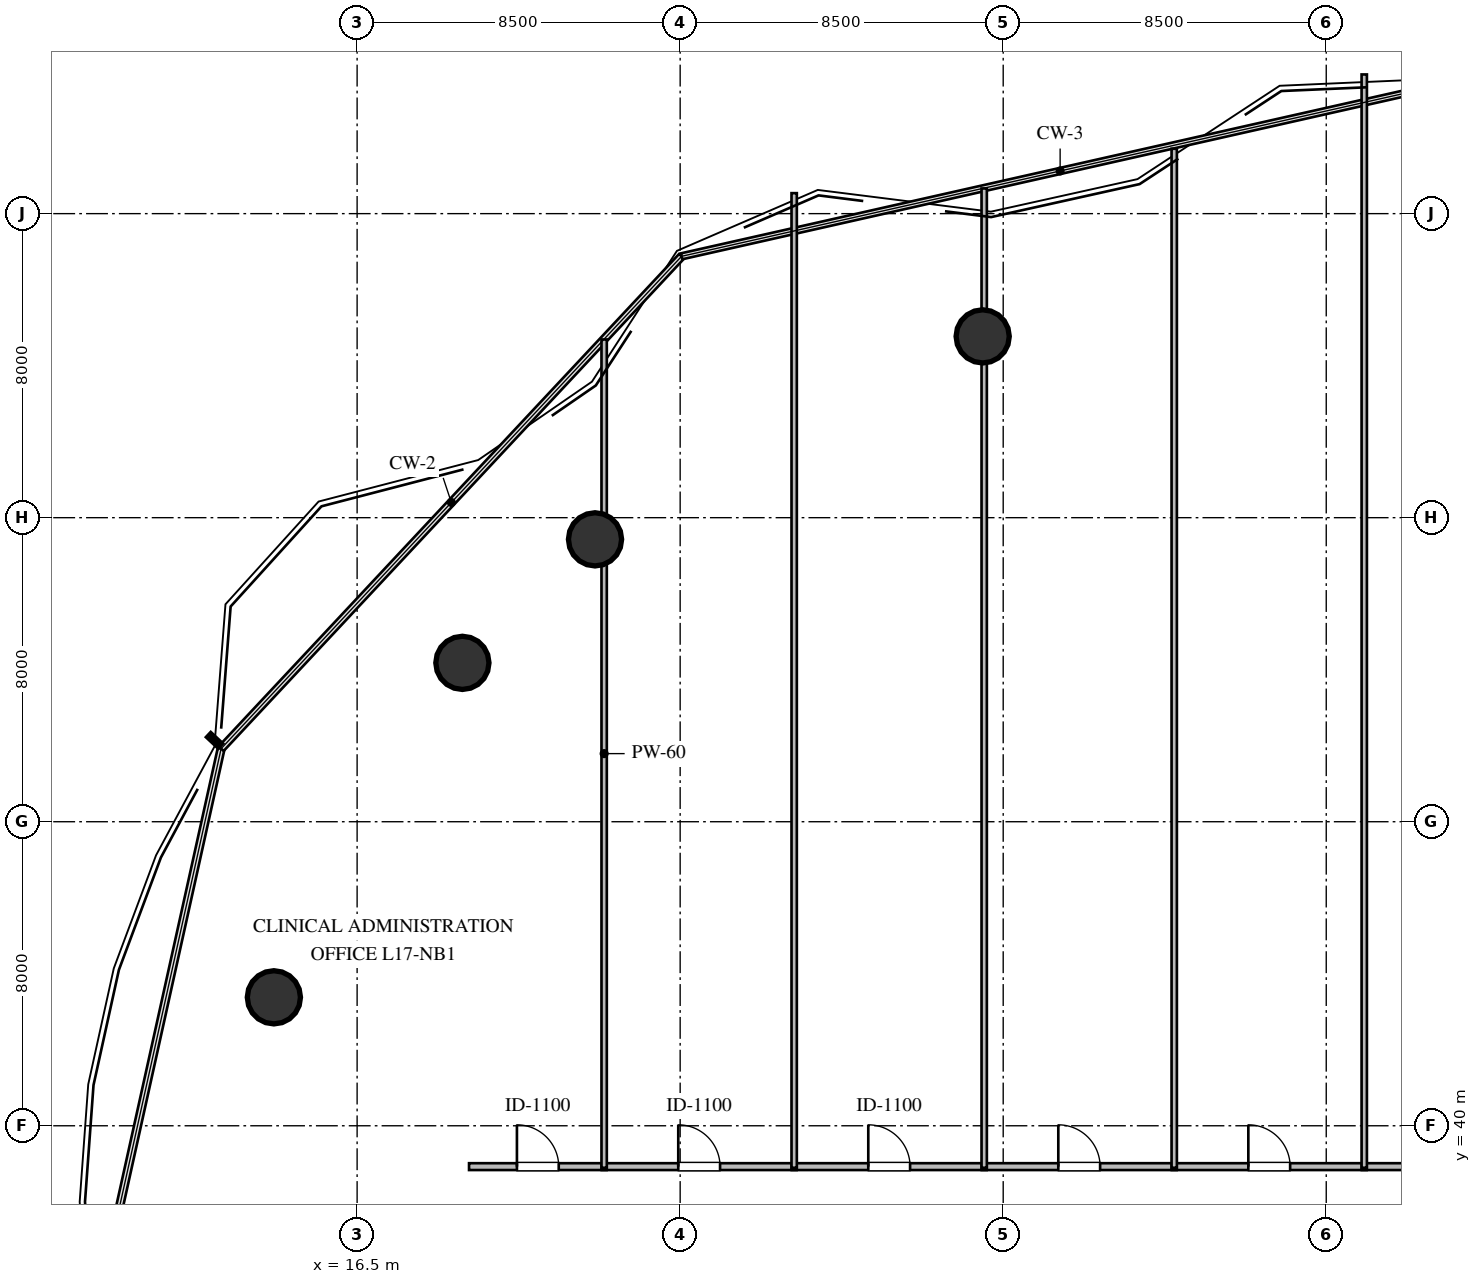
"""IFC4 building model, lengths in metres.
Left out: names, types, materials, properties, quantities, classifications, styles, units other than length and angle.
Written with IfcOpenShell. Run it as: python <this file> out.ifc"""

import sys

from ifc_helpers import new_model, si_unit, direction, frame, frame_2d, origin, origin_2d, place, context, subcontext, project, spatial, rectangle, circle, extrude, element, fill, save


model = new_model("IFC4")
c1 = context("Model", 3, precision=1e-05, world=origin(), true_north=direction((0.0, 1.0)))
c2 = subcontext(c1, "Body", "Model", "MODEL_VIEW")
j1 = project(units=[si_unit("LENGTHUNIT", "METRE"), si_unit("PLANEANGLEUNIT", "RADIAN")], contexts=[c1])
p1 = place(None, origin())
s1 = spatial("IfcSite", under=j1, at=p1, CompositionType="ELEMENT")
p2 = place(p1, origin())
s2 = spatial("IfcBuilding", under=s1, at=p2, CompositionType="ELEMENT")
p3 = place(p2, frame((0.0, 0.0, 67.2)))
s3 = spatial("IfcBuildingStorey", under=s2, at=p3, CompositionType="ELEMENT", Elevation=67.2)
for number, where, z_axis, x_axis in (
    (1, (32.96, 60.77, 0.0), (0.0, 0.0, 1.0), (1.0, 0.0, 0.0)),
    (2, (22.76, 55.43, 0.0), (0.0, 0.0, 1.0), (1.0, 0.0, 0.0)),
    (3, (19.27, 52.18, 0.0), (0.0, 0.0, 1.0), (1.0, 0.0, 0.0)),
    (4, (14.31, 43.38, 0.0), (0.0, 0.0, 1.0), (1.0, 0.0, 0.0)),
):
    element("IfcColumn", number, at=place(p3, frame(where, z_axis=z_axis, x_axis=x_axis)), inside=s3, PredefinedType="COLUMN", context=c2, shape_type="SweptSolid", body=[
        extrude(circle(Radius=0.7, at=origin_2d()), origin(), (0.0, 0.0, 1.0), 3.6),
    ])
p4 = place(p3, frame((19.445, 38.925, 0.0), z_axis=(0.0, 0.0, 1.0), x_axis=(1.0, 0.0, 0.0)))
e5 = element("IfcWall", 5, at=p4, inside=s3, PredefinedType="PARTITIONING", context=c2, shape_type="SweptSolid", body=[
    extrude(rectangle(XDim=3.62, YDim=0.18, at=frame_2d((1.81, 0.0))), origin(), (0.0, 0.0, 1.0), 3.36),
])
p5 = place(p4, frame((1.26, 0.0, 0.0)))
e6 = element("IfcOpeningElement", 6, at=p5, cuts=e5, PredefinedType="OPENING", context=c2, shape_type="SweptSolid", body=[
    extrude(rectangle(XDim=1.1, YDim=2.1, at=frame_2d((0.55, 1.05))), frame((0.0, 0.1, 0.0), z_axis=(0.0, -1.0, 0.0), x_axis=(1.0, 0.0, 0.0)), (0.0, 0.0, 1.0), 0.2),
])
p6 = place(p3, frame((22.935, 38.925, 0.0), z_axis=(0.0, 0.0, 1.0), x_axis=(1.0, 0.0, 0.0)))
e7 = element("IfcWall", 7, at=p6, inside=s3, PredefinedType="PARTITIONING", context=c2, shape_type="SweptSolid", body=[
    extrude(rectangle(XDim=5.13, YDim=0.18, at=frame_2d((2.565, 0.0))), origin(), (0.0, 0.0, 1.0), 3.36),
])
p7 = place(p6, frame((2.015, 0.0, 0.0)))
e8 = element("IfcOpeningElement", 8, at=p7, cuts=e7, PredefinedType="OPENING", context=c2, shape_type="SweptSolid", body=[
    extrude(rectangle(XDim=1.1, YDim=2.1, at=frame_2d((0.55, 1.05))), frame((0.0, 0.1, 0.0), z_axis=(0.0, -1.0, 0.0), x_axis=(1.0, 0.0, 0.0)), (0.0, 0.0, 1.0), 0.2),
])
p8 = place(p3, frame((27.935, 38.925, 0.0), z_axis=(0.0, 0.0, 1.0), x_axis=(1.0, 0.0, 0.0)))
e9 = element("IfcWall", 9, at=p8, inside=s3, PredefinedType="PARTITIONING", context=c2, shape_type="SweptSolid", body=[
    extrude(rectangle(XDim=5.13, YDim=0.18, at=frame_2d((2.565, 0.0))), origin(), (0.0, 0.0, 1.0), 3.36),
])
p9 = place(p8, frame((2.015, 0.0, 0.0)))
e10 = element("IfcOpeningElement", 10, at=p9, cuts=e9, PredefinedType="OPENING", context=c2, shape_type="SweptSolid", body=[
    extrude(rectangle(XDim=1.1, YDim=2.1, at=frame_2d((0.55, 1.05))), frame((0.0, 0.1, 0.0), z_axis=(0.0, -1.0, 0.0), x_axis=(1.0, 0.0, 0.0)), (0.0, 0.0, 1.0), 0.2),
])
p10 = place(p3, frame((32.935, 38.925, 0.0), z_axis=(0.0, 0.0, 1.0), x_axis=(1.0, 0.0, 0.0)))
e11 = element("IfcWall", 11, at=p10, inside=s3, PredefinedType="PARTITIONING", context=c2, shape_type="SweptSolid", body=[
    extrude(rectangle(XDim=5.13, YDim=0.18, at=frame_2d((2.565, 0.0))), origin(), (0.0, 0.0, 1.0), 3.36),
])
p11 = place(p10, frame((2.015, 0.0, 0.0)))
e12 = element("IfcOpeningElement", 12, at=p11, cuts=e11, PredefinedType="OPENING", context=c2, shape_type="SweptSolid", body=[
    extrude(rectangle(XDim=1.1, YDim=2.1, at=frame_2d((0.55, 1.05))), frame((0.0, 0.1, 0.0), z_axis=(0.0, -1.0, 0.0), x_axis=(1.0, 0.0, 0.0)), (0.0, 0.0, 1.0), 0.2),
])
p12 = place(p3, frame((37.935, 38.925, 0.0), z_axis=(0.0, 0.0, 1.0), x_axis=(1.0, 0.0, 0.0)))
e13 = element("IfcWall", 13, at=p12, inside=s3, PredefinedType="PARTITIONING", context=c2, shape_type="SweptSolid", body=[
    extrude(rectangle(XDim=5.13, YDim=0.18, at=frame_2d((2.565, 0.0))), origin(), (0.0, 0.0, 1.0), 3.36),
])
p13 = place(p12, frame((2.015, 0.0, 0.0)))
e14 = element("IfcOpeningElement", 14, at=p13, cuts=e13, PredefinedType="OPENING", context=c2, shape_type="SweptSolid", body=[
    extrude(rectangle(XDim=1.1, YDim=2.1, at=frame_2d((0.55, 1.05))), frame((0.0, 0.1, 0.0), z_axis=(0.0, -1.0, 0.0), x_axis=(1.0, 0.0, 0.0)), (0.0, 0.0, 1.0), 0.2),
])
p14 = place(p3, frame((42.935, 38.925, 0.0), z_axis=(0.0, 0.0, 1.0), x_axis=(1.0, 0.0, 0.0)))
e15 = element("IfcWall", 15, at=p14, inside=s3, PredefinedType="PARTITIONING", context=c2, shape_type="SweptSolid", body=[
    extrude(rectangle(XDim=3.62, YDim=0.18, at=frame_2d((1.81, 0.0))), origin(), (0.0, 0.0, 1.0), 3.36),
])
p15 = place(p14, frame((1.26, 0.0, 0.0)))
e16 = element("IfcOpeningElement", 16, at=p15, cuts=e15, PredefinedType="OPENING", context=c2, shape_type="SweptSolid", body=[
    extrude(rectangle(XDim=1.1, YDim=2.1, at=frame_2d((0.55, 1.05))), frame((0.0, 0.1, 0.0), z_axis=(0.0, -1.0, 0.0), x_axis=(1.0, 0.0, 0.0)), (0.0, 0.0, 1.0), 0.2),
])
p16 = place(p3, frame((23.0, 60.689, 0.0), z_axis=(0.0, 0.0, 1.0), x_axis=(0.0, -1.0, 0.0)))
e17 = element("IfcWall", 17, at=p16, inside=s3, PredefinedType="PARTITIONING", context=c2, shape_type="SweptSolid", body=[
    extrude(rectangle(XDim=21.794, YDim=0.14, at=frame_2d((10.897, 0.0))), origin(), (0.0, 0.0, 1.0), 2.89),
])
p17 = place(p3, frame((28.0, 64.539, 0.0), z_axis=(0.0, 0.0, 1.0), x_axis=(0.0, -1.0, 0.0)))
e18 = element("IfcWall", 18, at=p17, inside=s3, PredefinedType="PARTITIONING", context=c2, shape_type="SweptSolid", body=[
    extrude(rectangle(XDim=25.644, YDim=0.14, at=frame_2d((12.822, 0.0))), origin(), (0.0, 0.0, 1.0), 3.36),
])
p18 = place(p3, frame((33.0, 64.662, 0.0), z_axis=(0.0, 0.0, 1.0), x_axis=(0.0, -1.0, 0.0)))
e19 = element("IfcWall", 19, at=p18, inside=s3, PredefinedType="PARTITIONING", context=c2, shape_type="SweptSolid", body=[
    extrude(rectangle(XDim=25.767, YDim=0.14, at=frame_2d((12.884, 0.0))), origin(), (0.0, 0.0, 1.0), 2.89),
])
p19 = place(p3, frame((38.0, 65.707, 0.0), z_axis=(0.0, 0.0, 1.0), x_axis=(0.0, -1.0, 0.0)))
e20 = element("IfcWall", 20, at=p19, inside=s3, PredefinedType="PARTITIONING", context=c2, shape_type="SweptSolid", body=[
    extrude(rectangle(XDim=26.812, YDim=0.14, at=frame_2d((13.406, 0.0))), origin(), (0.0, 0.0, 1.0), 3.36),
])
p20 = place(p3, frame((43.0, 67.662, 0.0), z_axis=(0.0, 0.0, 1.0), x_axis=(0.0, -1.0, 0.0)))
e21 = element("IfcWall", 21, at=p20, inside=s3, PredefinedType="PARTITIONING", context=c2, shape_type="SweptSolid", body=[
    extrude(rectangle(XDim=28.767, YDim=0.14, at=frame_2d((14.384, 0.0))), origin(), (0.0, 0.0, 1.0), 3.36),
])
p21 = place(p5, origin())
e22 = element("IfcDoor", 22, at=p21, inside=s3, OperationType="SINGLE_SWING_LEFT", PredefinedType="DOOR", context=c2, shape_type="SweptSolid", body=[
    extrude(rectangle(XDim=1.1, YDim=2.1, at=frame_2d((0.55, 1.05))), frame((0.0, 0.025, 0.0), z_axis=(0.0, -1.0, 0.0), x_axis=(1.0, 0.0, 0.0)), (0.0, 0.0, 1.0), 0.05),
])
fill(e6, e22)
p22 = place(p7, origin())
e23 = element("IfcDoor", 23, at=p22, inside=s3, OperationType="SINGLE_SWING_LEFT", PredefinedType="DOOR", context=c2, shape_type="SweptSolid", body=[
    extrude(rectangle(XDim=1.1, YDim=2.1, at=frame_2d((0.55, 1.05))), frame((0.0, 0.025, 0.0), z_axis=(0.0, -1.0, 0.0), x_axis=(1.0, 0.0, 0.0)), (0.0, 0.0, 1.0), 0.05),
])
fill(e8, e23)
p23 = place(p9, origin())
e24 = element("IfcDoor", 24, at=p23, inside=s3, OperationType="SINGLE_SWING_LEFT", PredefinedType="DOOR", context=c2, shape_type="SweptSolid", body=[
    extrude(rectangle(XDim=1.1, YDim=2.1, at=frame_2d((0.55, 1.05))), frame((0.0, 0.025, 0.0), z_axis=(0.0, -1.0, 0.0), x_axis=(1.0, 0.0, 0.0)), (0.0, 0.0, 1.0), 0.05),
])
fill(e10, e24)
p24 = place(p11, origin())
e25 = element("IfcDoor", 25, at=p24, inside=s3, OperationType="SINGLE_SWING_LEFT", PredefinedType="DOOR", context=c2, shape_type="SweptSolid", body=[
    extrude(rectangle(XDim=1.1, YDim=2.1, at=frame_2d((0.55, 1.05))), frame((0.0, 0.025, 0.0), z_axis=(0.0, -1.0, 0.0), x_axis=(1.0, 0.0, 0.0)), (0.0, 0.0, 1.0), 0.05),
])
fill(e12, e25)
p25 = place(p13, origin())
e26 = element("IfcDoor", 26, at=p25, inside=s3, OperationType="SINGLE_SWING_LEFT", PredefinedType="DOOR", context=c2, shape_type="SweptSolid", body=[
    extrude(rectangle(XDim=1.1, YDim=2.1, at=frame_2d((0.55, 1.05))), frame((0.0, 0.025, 0.0), z_axis=(0.0, -1.0, 0.0), x_axis=(1.0, 0.0, 0.0)), (0.0, 0.0, 1.0), 0.05),
])
fill(e14, e26)
save(model, sys.argv[1])
